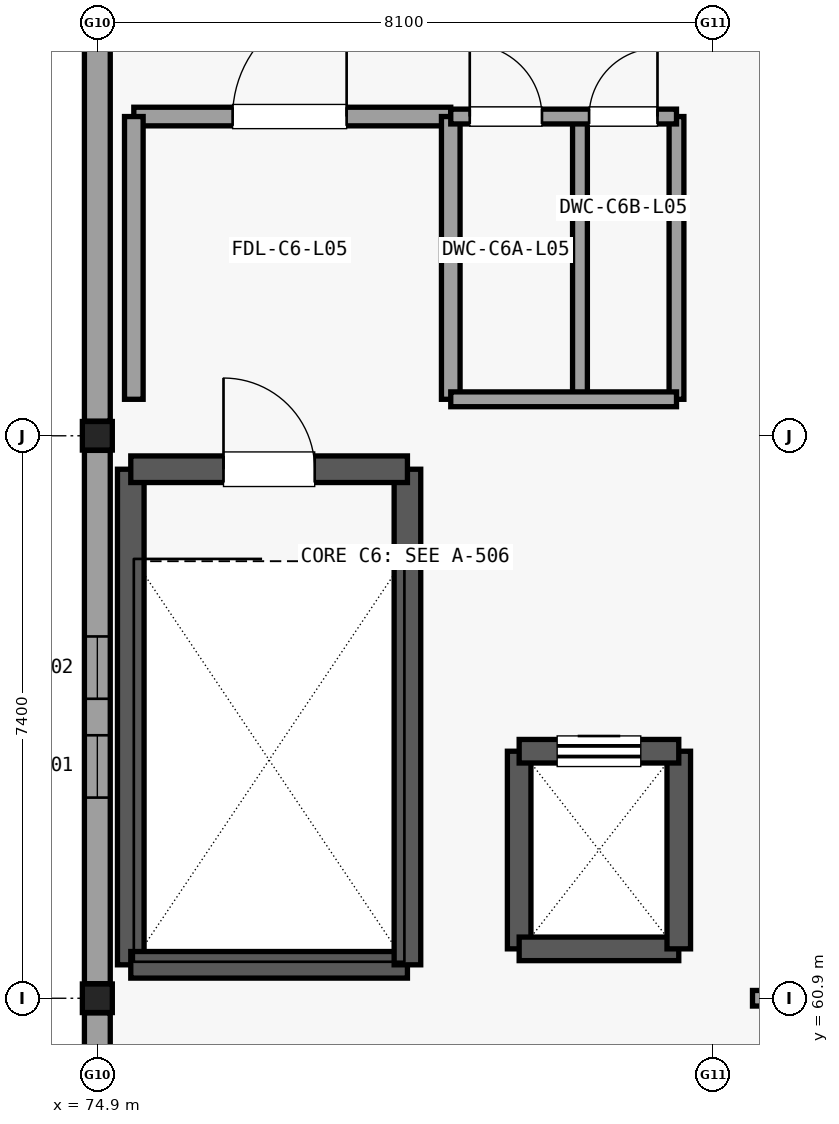
"""IFC4 building model, lengths in metres.
Left out: names, types, materials, properties, quantities, classifications, styles, units other than length and angle.
Written with IfcOpenShell. Run it as: python <this file> out.ifc"""

import sys

from ifc_helpers import new_model, si_unit, direction, frame, frame_2d, origin, origin_2d, place, context, subcontext, project, spatial, rectangle, i_section, extrude, element, fill, save


model = new_model("IFC4")
c1 = context("Model", 3, precision=1e-05, world=origin(), true_north=direction((0.0, 1.0)))
c2 = subcontext(c1, "Body", "Model", "MODEL_VIEW")
j1 = project(units=[si_unit("LENGTHUNIT", "METRE"), si_unit("PLANEANGLEUNIT", "RADIAN")], contexts=[c1])
p1 = place(None, origin())
s1 = spatial("IfcSite", under=j1, at=p1, CompositionType="ELEMENT")
p2 = place(p1, origin())
s2 = spatial("IfcBuilding", under=s1, at=p2, CompositionType="ELEMENT")
p3 = place(p2, frame((0.0, 0.0, 21.0)))
s3 = spatial("IfcBuildingStorey", under=s2, at=p3, CompositionType="ELEMENT", Elevation=21.0)
for number, where, z_axis, x_axis in (
    (1, (74.9, 60.9, 0.0), (0.0, 0.0, 1.0), (1.0, 0.0, 0.0)),
    (2, (74.9, 68.3, 0.0), (0.0, 0.0, 1.0), (1.0, 0.0, 0.0)),
):
    element("IfcColumn", number, at=place(p3, frame(where, z_axis=z_axis, x_axis=x_axis)), inside=s3, PredefinedType="COLUMN", context=c2, shape_type="SweptSolid", body=[
        extrude(i_section(OverallWidth=0.394, OverallDepth=0.376, WebThickness=0.017, FlangeThickness=0.028, at=origin_2d()), origin(), (0.0, 0.0, 1.0), 5.4),
    ])
p4 = place(p3, frame((74.9, 53.692, 0.0), z_axis=(0.0, 0.0, 1.0), x_axis=(0.0, 1.0, 0.0)))
e3 = element("IfcWall", 3, at=p4, inside=s3, PredefinedType="SOLIDWALL", context=c2, shape_type="SweptSolid", body=[
    extrude(rectangle(XDim=7.016, YDim=0.34, at=frame_2d((3.508, 0.0))), origin(), (0.0, 0.0, 1.0), 4.718),
])
p5 = place(p3, frame((74.9, 61.092, 0.0), z_axis=(0.0, 0.0, 1.0), x_axis=(0.0, 1.0, 0.0)))
e4 = element("IfcWall", 4, at=p5, inside=s3, PredefinedType="SOLIDWALL", context=c2, shape_type="SweptSolid", body=[
    extrude(rectangle(XDim=7.016, YDim=0.34, at=frame_2d((3.508, 0.0))), origin(), (0.0, 0.0, 1.0), 4.718),
])
p6 = place(p5, frame((2.448, 0.0, 2.35)))
e5 = element("IfcOpeningElement", 5, at=p6, cuts=e4, PredefinedType="OPENING", context=c2, shape_type="SweptSolid", body=[
    extrude(rectangle(XDim=0.82, YDim=1.54, at=frame_2d((0.41, 0.77))), frame((0.0, 0.18, 0.0), z_axis=(0.0, -1.0, 0.0), x_axis=(1.0, 0.0, 0.0)), (0.0, 0.0, 1.0), 0.36),
])
p7 = place(p5, frame((3.748, 0.0, 2.35)))
e6 = element("IfcOpeningElement", 6, at=p7, cuts=e4, PredefinedType="OPENING", context=c2, shape_type="SweptSolid", body=[
    extrude(rectangle(XDim=0.82, YDim=1.54, at=frame_2d((0.41, 0.77))), frame((0.0, 0.18, 0.0), z_axis=(0.0, -1.0, 0.0), x_axis=(1.0, 0.0, 0.0)), (0.0, 0.0, 1.0), 0.36),
])
p8 = place(p3, frame((74.9, 68.492, 0.0), z_axis=(0.0, 0.0, 1.0), x_axis=(0.0, 1.0, 0.0)))
e7 = element("IfcWall", 7, at=p8, inside=s3, PredefinedType="SOLIDWALL", context=c2, shape_type="SweptSolid", body=[
    extrude(rectangle(XDim=7.016, YDim=0.34, at=frame_2d((3.508, 0.0))), origin(), (0.0, 0.0, 1.0), 4.718),
])
p9 = place(p3, frame((75.34, 61.34, 0.0), z_axis=(0.0, 0.0, 1.0), x_axis=(0.0, 1.0, 0.0)))
e8 = element("IfcWall", 8, at=p9, inside=s3, PredefinedType="SHEAR", context=c2, shape_type="SweptSolid", body=[
    extrude(rectangle(XDim=6.52, YDim=0.35, at=frame_2d((3.26, 0.0))), origin(), (0.0, 0.0, 1.0), 5.185),
])
p10 = place(p3, frame((75.34, 61.34, 0.0), z_axis=(0.0, 0.0, 1.0), x_axis=(1.0, 0.0, 0.0)))
e9 = element("IfcWall", 9, at=p10, inside=s3, PredefinedType="SHEAR", context=c2, shape_type="SweptSolid", body=[
    extrude(rectangle(XDim=3.64, YDim=0.35, at=frame_2d((1.82, 0.0))), origin(), (0.0, 0.0, 1.0), 5.185),
])
p11 = place(p3, frame((78.98, 61.34, 0.0), z_axis=(0.0, 0.0, 1.0), x_axis=(0.0, 1.0, 0.0)))
e10 = element("IfcWall", 10, at=p11, inside=s3, PredefinedType="SHEAR", context=c2, shape_type="SweptSolid", body=[
    extrude(rectangle(XDim=6.52, YDim=0.35, at=frame_2d((3.26, 0.0))), origin(), (0.0, 0.0, 1.0), 5.185),
])
p12 = place(p3, frame((75.34, 67.86, 0.0), z_axis=(0.0, 0.0, 1.0), x_axis=(1.0, 0.0, 0.0)))
e11 = element("IfcWall", 11, at=p12, inside=s3, PredefinedType="SHEAR", context=c2, shape_type="SweptSolid", body=[
    extrude(rectangle(XDim=3.64, YDim=0.35, at=frame_2d((1.82, 0.0))), origin(), (0.0, 0.0, 1.0), 5.185),
])
p13 = place(p12, frame((1.22, 0.0, 0.0)))
e12 = element("IfcOpeningElement", 12, at=p13, cuts=e11, PredefinedType="OPENING", context=c2, shape_type="SweptSolid", body=[
    extrude(rectangle(XDim=1.2, YDim=2.15, at=frame_2d((0.6, 1.075))), frame((0.0, 0.185, 0.0), z_axis=(0.0, -1.0, 0.0), x_axis=(1.0, 0.0, 0.0)), (0.0, 0.0, 1.0), 0.37),
])
p14 = place(p3, frame((80.45, 61.55, 0.0), z_axis=(0.0, 0.0, 1.0), x_axis=(0.0, 1.0, 0.0)))
e13 = element("IfcWall", 13, at=p14, inside=s3, PredefinedType="SHEAR", context=c2, shape_type="SweptSolid", body=[
    extrude(rectangle(XDim=2.6, YDim=0.31, at=frame_2d((1.3, 0.0))), origin(), (0.0, 0.0, 1.0), 5.185),
])
p15 = place(p3, frame((80.45, 61.55, 0.0), z_axis=(0.0, 0.0, 1.0), x_axis=(1.0, 0.0, 0.0)))
e14 = element("IfcWall", 14, at=p15, inside=s3, PredefinedType="SHEAR", context=c2, shape_type="SweptSolid", body=[
    extrude(rectangle(XDim=2.1, YDim=0.31, at=frame_2d((1.05, 0.0))), origin(), (0.0, 0.0, 1.0), 5.185),
])
p16 = place(p3, frame((82.55, 61.55, 0.0), z_axis=(0.0, 0.0, 1.0), x_axis=(0.0, 1.0, 0.0)))
e15 = element("IfcWall", 15, at=p16, inside=s3, PredefinedType="SHEAR", context=c2, shape_type="SweptSolid", body=[
    extrude(rectangle(XDim=2.6, YDim=0.31, at=frame_2d((1.3, 0.0))), origin(), (0.0, 0.0, 1.0), 5.185),
])
p17 = place(p3, frame((80.45, 64.15, 0.0), z_axis=(0.0, 0.0, 1.0), x_axis=(1.0, 0.0, 0.0)))
e16 = element("IfcWall", 16, at=p17, inside=s3, PredefinedType="SHEAR", context=c2, shape_type="SweptSolid", body=[
    extrude(rectangle(XDim=2.1, YDim=0.31, at=frame_2d((1.05, 0.0))), origin(), (0.0, 0.0, 1.0), 5.185),
])
p18 = place(p17, frame((0.5, 0.0, 0.0)))
e17 = element("IfcOpeningElement", 17, at=p18, cuts=e16, PredefinedType="OPENING", context=c2, shape_type="SweptSolid", body=[
    extrude(rectangle(XDim=1.1, YDim=2.15, at=frame_2d((0.55, 1.075))), frame((0.0, 0.165, 0.0), z_axis=(0.0, -1.0, 0.0), x_axis=(1.0, 0.0, 0.0)), (0.0, 0.0, 1.0), 0.33),
])
p19 = place(p3, frame((75.38, 72.5, 0.0), z_axis=(0.0, 0.0, 1.0), x_axis=(1.0, 0.0, 0.0)))
e18 = element("IfcWall", 18, at=p19, inside=s3, PredefinedType="PARTITIONING", context=c2, shape_type="SweptSolid", body=[
    extrude(rectangle(XDim=4.17, YDim=0.245, at=frame_2d((2.085, 0.0))), origin(), (0.0, 0.0, 1.0), 4.723),
])
p20 = place(p19, frame((1.3, 0.0, 0.0)))
e19 = element("IfcOpeningElement", 19, at=p20, cuts=e18, PredefinedType="OPENING", context=c2, shape_type="SweptSolid", body=[
    extrude(rectangle(XDim=1.5, YDim=2.15, at=frame_2d((0.75, 1.075))), frame((0.0, 0.133, 0.0), z_axis=(0.0, -1.0, 0.0), x_axis=(1.0, 0.0, 0.0)), (0.0, 0.0, 1.0), 0.265),
])
p21 = place(p3, frame((75.38, 68.78, 0.0), z_axis=(0.0, 0.0, 1.0), x_axis=(0.0, 1.0, 0.0)))
e20 = element("IfcWall", 20, at=p21, inside=s3, PredefinedType="PARTITIONING", context=c2, shape_type="SweptSolid", body=[
    extrude(rectangle(XDim=3.72, YDim=0.245, at=frame_2d((1.86, 0.0))), origin(), (0.0, 0.0, 1.0), 4.723),
])
p22 = place(p3, frame((79.55, 68.78, 0.0), z_axis=(0.0, 0.0, 1.0), x_axis=(0.0, 1.0, 0.0)))
e21 = element("IfcWall", 21, at=p22, inside=s3, PredefinedType="PARTITIONING", context=c2, shape_type="SweptSolid", body=[
    extrude(rectangle(XDim=3.72, YDim=0.245, at=frame_2d((1.86, 0.0))), origin(), (0.0, 0.0, 1.0), 5.175),
])
for number, where, z_axis, x_axis in (
    (22, (81.25, 68.78, 0.0), (0.0, 0.0, 1.0), (0.0, 1.0, 0.0)),
    (23, (82.52, 68.78, 0.0), (0.0, 0.0, 1.0), (0.0, 1.0, 0.0)),
):
    element("IfcWall", number, at=place(p3, frame(where, z_axis=z_axis, x_axis=x_axis)), inside=s3, PredefinedType="PARTITIONING", context=c2, shape_type="SweptSolid", body=[
        extrude(rectangle(XDim=3.72, YDim=0.195, at=frame_2d((1.86, 0.0))), origin(), (0.0, 0.0, 1.0), 5.175),
    ])
p23 = place(p3, frame((79.55, 68.78, 0.0), z_axis=(0.0, 0.0, 1.0), x_axis=(1.0, 0.0, 0.0)))
e24 = element("IfcWall", 24, at=p23, inside=s3, PredefinedType="PARTITIONING", context=c2, shape_type="SweptSolid", body=[
    extrude(rectangle(XDim=2.97, YDim=0.195, at=frame_2d((1.485, 0.0))), origin(), (0.0, 0.0, 1.0), 5.175),
])
p24 = place(p3, frame((79.55, 72.5, 0.0), z_axis=(0.0, 0.0, 1.0), x_axis=(1.0, 0.0, 0.0)))
e25 = element("IfcWall", 25, at=p24, inside=s3, PredefinedType="PARTITIONING", context=c2, shape_type="SweptSolid", body=[
    extrude(rectangle(XDim=2.97, YDim=0.195, at=frame_2d((1.485, 0.0))), origin(), (0.0, 0.0, 1.0), 5.175),
])
p25 = place(p24, frame((0.25, 0.0, 0.0)))
e26 = element("IfcOpeningElement", 26, at=p25, cuts=e25, PredefinedType="OPENING", context=c2, shape_type="SweptSolid", body=[
    extrude(rectangle(XDim=0.95, YDim=2.1, at=frame_2d((0.475, 1.05))), frame((0.0, 0.107, 0.0), z_axis=(0.0, -1.0, 0.0), x_axis=(1.0, 0.0, 0.0)), (0.0, 0.0, 1.0), 0.215),
])
p26 = place(p24, frame((1.82, 0.0, 0.0)))
e27 = element("IfcOpeningElement", 27, at=p26, cuts=e25, PredefinedType="OPENING", context=c2, shape_type="SweptSolid", body=[
    extrude(rectangle(XDim=0.9, YDim=2.1, at=frame_2d((0.45, 1.05))), frame((0.0, 0.107, 0.0), z_axis=(0.0, -1.0, 0.0), x_axis=(1.0, 0.0, 0.0)), (0.0, 0.0, 1.0), 0.215),
])
p27 = place(p3, frame((83.52, 60.9, 0.0), z_axis=(0.0, 0.0, 1.0), x_axis=(1.0, 0.0, 0.0)))
e28 = element("IfcWall", 28, at=p27, inside=s3, PredefinedType="PARTITIONING", context=c2, shape_type="SweptSolid", body=[
    extrude(rectangle(XDim=7.06, YDim=0.205, at=frame_2d((3.53, 0.0))), origin(), (0.0, 0.0, 1.0), 5.175),
])
p28 = place(p27, frame((2.755, 0.0, 0.0)))
e29 = element("IfcOpeningElement", 29, at=p28, cuts=e28, PredefinedType="OPENING", context=c2, shape_type="SweptSolid", body=[
    extrude(rectangle(XDim=1.55, YDim=2.2, at=frame_2d((0.775, 1.1))), frame((0.0, 0.113, 0.0), z_axis=(0.0, -1.0, 0.0), x_axis=(1.0, 0.0, 0.0)), (0.0, 0.0, 1.0), 0.225),
])
p29 = place(p6, origin())
e30 = element("IfcWindow", 30, at=p29, inside=s3, PartitioningType="SINGLE_PANEL", PredefinedType="WINDOW", context=c2, shape_type="SweptSolid", body=[
    extrude(rectangle(XDim=0.82, YDim=1.54, at=frame_2d((0.41, 0.77))), frame((0.0, 0.03, 0.0), z_axis=(0.0, -1.0, 0.0), x_axis=(1.0, 0.0, 0.0)), (0.0, 0.0, 1.0), 0.06),
])
fill(e5, e30)
p30 = place(p7, origin())
e31 = element("IfcWindow", 31, at=p30, inside=s3, PartitioningType="SINGLE_PANEL", PredefinedType="WINDOW", context=c2, shape_type="SweptSolid", body=[
    extrude(rectangle(XDim=0.82, YDim=1.54, at=frame_2d((0.41, 0.77))), frame((0.0, 0.03, 0.0), z_axis=(0.0, -1.0, 0.0), x_axis=(1.0, 0.0, 0.0)), (0.0, 0.0, 1.0), 0.06),
])
fill(e6, e31)
p31 = place(p13, origin())
e32 = element("IfcDoor", 32, at=p31, inside=s3, OperationType="SINGLE_SWING_LEFT", PredefinedType="DOOR", context=c2, shape_type="SweptSolid", body=[
    extrude(rectangle(XDim=1.2, YDim=2.15, at=frame_2d((0.6, 1.075))), frame((0.0, 0.025, 0.0), z_axis=(0.0, -1.0, 0.0), x_axis=(1.0, 0.0, 0.0)), (0.0, 0.0, 1.0), 0.05),
])
fill(e12, e32)
p32 = place(p18, origin())
e33 = element("IfcDoor", 33, at=p32, inside=s3, OperationType="SLIDING_TO_LEFT", PredefinedType="DOOR", context=c2, shape_type="SweptSolid", body=[
    extrude(rectangle(XDim=1.1, YDim=2.15, at=frame_2d((0.55, 1.075))), frame((0.0, 0.025, 0.0), z_axis=(0.0, -1.0, 0.0), x_axis=(1.0, 0.0, 0.0)), (0.0, 0.0, 1.0), 0.05),
])
fill(e17, e33)
p33 = place(p20, origin())
e34 = element("IfcDoor", 34, at=p33, inside=s3, OperationType="SINGLE_SWING_RIGHT", PredefinedType="DOOR", context=c2, shape_type="SweptSolid", body=[
    extrude(rectangle(XDim=1.5, YDim=2.15, at=frame_2d((0.75, 1.075))), frame((0.0, 0.025, 0.0), z_axis=(0.0, -1.0, 0.0), x_axis=(1.0, 0.0, 0.0)), (0.0, 0.0, 1.0), 0.05),
])
fill(e19, e34)
p34 = place(p25, origin())
e35 = element("IfcDoor", 35, at=p34, inside=s3, OperationType="SINGLE_SWING_LEFT", PredefinedType="DOOR", context=c2, shape_type="SweptSolid", body=[
    extrude(rectangle(XDim=0.95, YDim=2.1, at=frame_2d((0.475, 1.05))), frame((0.0, 0.025, 0.0), z_axis=(0.0, -1.0, 0.0), x_axis=(1.0, 0.0, 0.0)), (0.0, 0.0, 1.0), 0.05),
])
fill(e26, e35)
p35 = place(p26, origin())
e36 = element("IfcDoor", 36, at=p35, inside=s3, OperationType="SINGLE_SWING_RIGHT", PredefinedType="DOOR", context=c2, shape_type="SweptSolid", body=[
    extrude(rectangle(XDim=0.9, YDim=2.1, at=frame_2d((0.45, 1.05))), frame((0.0, 0.025, 0.0), z_axis=(0.0, -1.0, 0.0), x_axis=(1.0, 0.0, 0.0)), (0.0, 0.0, 1.0), 0.05),
])
fill(e27, e36)
save(model, sys.argv[1])
